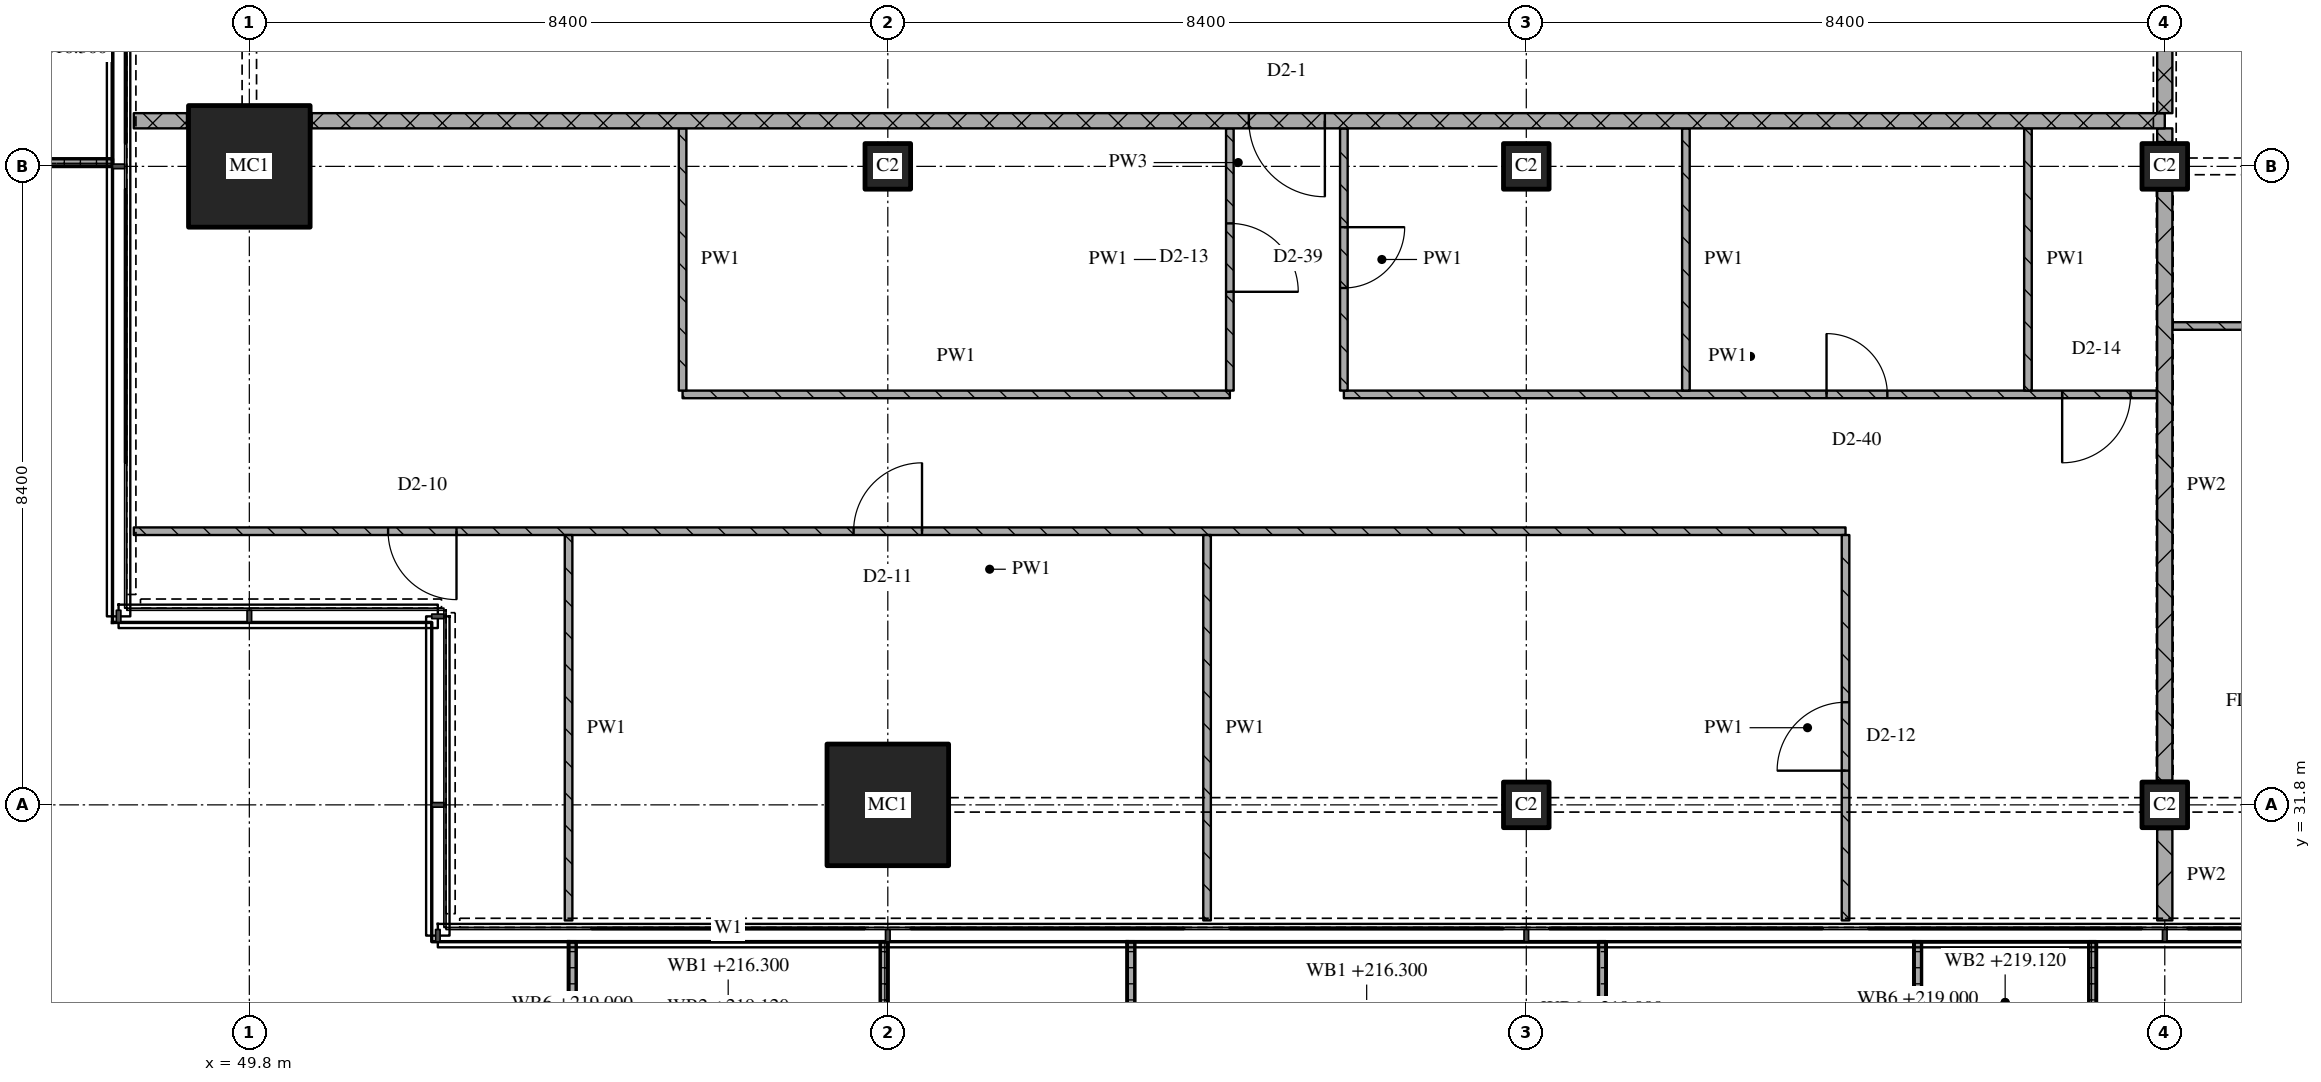
"""IFC4 building model, lengths in metres.
Left out: names, types, materials, properties, quantities, classifications, styles, units other than length and angle.
Written with IfcOpenShell. Run it as: python <this file> out.ifc"""

import sys

from ifc_helpers import new_model, si_unit, direction, frame, frame_2d, origin, origin_2d, place, context, subcontext, project, spatial, polyline, rectangle, outline, extrude, element, fill, save


model = new_model("IFC4")
c1 = context("Model", 3, precision=1e-05, world=origin(), true_north=direction((0.0, 1.0)))
c2 = subcontext(c1, "Body", "Model", "MODEL_VIEW")
j1 = project(units=[si_unit("LENGTHUNIT", "METRE"), si_unit("PLANEANGLEUNIT", "RADIAN")], contexts=[c1])
p1 = place(None, origin())
s1 = spatial("IfcSite", under=j1, at=p1, CompositionType="ELEMENT")
p2 = place(p1, origin())
s2 = spatial("IfcBuilding", under=s1, at=p2, CompositionType="ELEMENT")
p3 = place(p2, frame((0.0, 0.0, 216.3)))
s3 = spatial("IfcBuildingStorey", under=s2, at=p3, CompositionType="ELEMENT", Elevation=216.3)
for number, where, z_axis, x_axis in (
    (1, (49.8, 40.2, 0.0), (0.0, 0.0, 1.0), (1.0, 0.0, 0.0)),
    (2, (58.2, 31.8, 0.0), (0.0, 0.0, 1.0), (1.0, 0.0, 0.0)),
):
    element("IfcColumn", number, at=place(p3, frame(where, z_axis=z_axis, x_axis=x_axis)), inside=s3, PredefinedType="COLUMN", context=c2, shape_type="SweptSolid", body=[
        extrude(rectangle(XDim=1.6, YDim=1.6, at=origin_2d()), origin(), (0.0, 0.0, 1.0), 3.6),
    ])
for number, where, z_axis, x_axis in (
    (3, (58.2, 40.2, 0.0), (0.0, 0.0, 1.0), (1.0, 0.0, 0.0)),
    (4, (66.6, 31.8, 0.0), (0.0, 0.0, 1.0), (1.0, 0.0, 0.0)),
    (5, (66.6, 40.2, 0.0), (0.0, 0.0, 1.0), (1.0, 0.0, 0.0)),
    (6, (75.0, 31.8, 0.0), (0.0, 0.0, 1.0), (1.0, 0.0, 0.0)),
    (7, (75.0, 40.2, 0.0), (0.0, 0.0, 1.0), (1.0, 0.0, 0.0)),
):
    element("IfcColumn", number, at=place(p3, frame(where, z_axis=z_axis, x_axis=x_axis)), inside=s3, PredefinedType="COLUMN", context=c2, shape_type="SweptSolid", body=[
        extrude(rectangle(XDim=0.6, YDim=0.6, at=origin_2d()), origin(), (0.0, 0.0, 1.0), 3.6),
    ])
p4 = place(p3, origin())
e8 = element("IfcWall", 8, at=p4, inside=s3, PredefinedType="SOLIDWALL", context=c2, shape_type="SweptSolid", body=[
    extrude(outline(polyline([(54.0, 30.0), (54.1, 30.0), (54.1, 28.367), (58.1, 28.367), (58.1, 30.0), (58.2, 30.0), (58.2, 28.267), (54.0, 28.267), (54.0, 30.0)])), origin(), (0.0, 0.0, 1.0), 1.0),
])
p5 = place(p3, origin())
e9 = element("IfcWall", 9, at=p5, inside=s3, PredefinedType="SOLIDWALL", context=c2, shape_type="SweptSolid", body=[
    extrude(outline(polyline([(61.35, 30.0), (61.45, 30.0), (61.45, 28.233), (67.55, 28.233), (67.55, 30.0), (67.65, 30.0), (67.65, 28.133), (61.35, 28.133), (61.35, 30.0)])), origin(), (0.0, 0.0, 1.0), 1.0),
])
p6 = place(p3, origin())
e10 = element("IfcWall", 10, at=p6, inside=s3, PredefinedType="SOLIDWALL", context=c2, shape_type="SweptSolid", body=[
    extrude(outline(polyline([(71.7, 30.0), (71.8, 30.0), (71.8, 28.5), (74.0, 28.5), (74.0, 30.0), (74.1, 30.0), (74.1, 28.4), (71.7, 28.4), (71.7, 30.0)])), origin(), (0.0, 0.0, 1.0), 1.0),
])
p7 = place(p3, origin())
e11 = element("IfcWall", 11, at=p7, inside=s3, PredefinedType="SOLIDWALL", context=c2, shape_type="SweptSolid", body=[
    extrude(outline(polyline([(48.0, 44.4), (48.0, 44.3), (46.367, 44.3), (46.367, 40.3), (48.0, 40.3), (48.0, 40.2), (46.267, 40.2), (46.267, 44.4), (48.0, 44.4)])), origin(), (0.0, 0.0, 1.0), 1.0),
])
p8 = place(p3, frame((70.8, 35.4, 0.0), z_axis=(0.0, 0.0, 1.0), x_axis=(-1.0, 0.0, 0.0)))
e12 = element("IfcWall", 12, at=p8, inside=s3, PredefinedType="PARTITIONING", context=c2, shape_type="SweptSolid", body=[
    extrude(rectangle(XDim=22.52, YDim=0.1, at=frame_2d((11.26, 0.0))), origin(), (0.0, 0.0, 1.0), 3.32),
])
p9 = place(p8, frame((12.15, 0.0, 0.0)))
e13 = element("IfcOpeningElement", 13, at=p9, cuts=e12, PredefinedType="OPENING", context=c2, shape_type="SweptSolid", body=[
    extrude(rectangle(XDim=0.9, YDim=2.1, at=frame_2d((0.45, 1.05))), frame((0.0, 0.06, 0.0), z_axis=(0.0, -1.0, 0.0), x_axis=(1.0, 0.0, 0.0)), (0.0, 0.0, 1.0), 0.12),
])
p10 = place(p8, frame((18.274, 0.0, 0.0)))
e14 = element("IfcOpeningElement", 14, at=p10, cuts=e12, PredefinedType="OPENING", context=c2, shape_type="SweptSolid", body=[
    extrude(rectangle(XDim=0.9, YDim=2.1, at=frame_2d((0.45, 1.05))), frame((0.0, 0.06, 0.0), z_axis=(0.0, -1.0, 0.0), x_axis=(1.0, 0.0, 0.0)), (0.0, 0.0, 1.0), 0.12),
])
p11 = place(p3, frame((55.5, 37.2, 0.0), z_axis=(0.0, 0.0, 1.0), x_axis=(1.0, 0.0, 0.0)))
e15 = element("IfcWall", 15, at=p11, inside=s3, PredefinedType="PARTITIONING", context=c2, shape_type="SweptSolid", body=[
    extrude(rectangle(XDim=7.2, YDim=0.1, at=frame_2d((3.6, 0.0))), origin(), (0.0, 0.0, 1.0), 3.32),
])
p12 = place(p3, frame((64.2, 37.2, 0.0), z_axis=(0.0, 0.0, 1.0), x_axis=(1.0, 0.0, 0.0)))
e16 = element("IfcWall", 16, at=p12, inside=s3, PredefinedType="PARTITIONING", context=c2, shape_type="SweptSolid", body=[
    extrude(rectangle(XDim=10.7, YDim=0.1, at=frame_2d((5.35, 0.0))), origin(), (0.0, 0.0, 1.0), 3.32),
])
p13 = place(p12, frame((6.35, 0.0, 0.0)))
e17 = element("IfcOpeningElement", 17, at=p13, cuts=e16, PredefinedType="OPENING", context=c2, shape_type="SweptSolid", body=[
    extrude(rectangle(XDim=0.8, YDim=2.1, at=frame_2d((0.4, 1.05))), frame((0.0, 0.06, 0.0), z_axis=(0.0, -1.0, 0.0), x_axis=(1.0, 0.0, 0.0)), (0.0, 0.0, 1.0), 0.12),
])
p14 = place(p12, frame((9.45, 0.0, 0.0)))
e18 = element("IfcOpeningElement", 18, at=p14, cuts=e16, PredefinedType="OPENING", context=c2, shape_type="SweptSolid", body=[
    extrude(rectangle(XDim=0.9, YDim=2.1, at=frame_2d((0.45, 1.05))), frame((0.0, 0.06, 0.0), z_axis=(0.0, -1.0, 0.0), x_axis=(1.0, 0.0, 0.0)), (0.0, 0.0, 1.0), 0.12),
])
p15 = place(p3, frame((75.1, 38.1, 0.0), z_axis=(0.0, 0.0, 1.0), x_axis=(1.0, 0.0, 0.0)))
e19 = element("IfcWall", 19, at=p15, inside=s3, PredefinedType="PARTITIONING", context=c2, shape_type="SweptSolid", body=[
    extrude(rectangle(XDim=11.3, YDim=0.1, at=frame_2d((5.65, 0.0))), origin(), (0.0, 0.0, 1.0), 3.32),
])
p16 = place(p15, frame((1.75, 0.0, 0.0)))
e20 = element("IfcOpeningElement", 20, at=p16, cuts=e19, PredefinedType="OPENING", context=c2, shape_type="SweptSolid", body=[
    extrude(rectangle(XDim=0.8, YDim=2.1, at=frame_2d((0.4, 1.05))), frame((0.0, 0.06, 0.0), z_axis=(0.0, -1.0, 0.0), x_axis=(1.0, 0.0, 0.0)), (0.0, 0.0, 1.0), 0.12),
])
p17 = place(p15, frame((6.25, 0.0, 0.0)))
e21 = element("IfcOpeningElement", 21, at=p17, cuts=e19, PredefinedType="OPENING", context=c2, shape_type="SweptSolid", body=[
    extrude(rectangle(XDim=0.8, YDim=2.1, at=frame_2d((0.4, 1.05))), frame((0.0, 0.06, 0.0), z_axis=(0.0, -1.0, 0.0), x_axis=(1.0, 0.0, 0.0)), (0.0, 0.0, 1.0), 0.12),
])
p18 = place(p15, frame((9.65, 0.0, 0.0)))
e22 = element("IfcOpeningElement", 22, at=p18, cuts=e19, PredefinedType="OPENING", context=c2, shape_type="SweptSolid", body=[
    extrude(rectangle(XDim=0.9, YDim=2.1, at=frame_2d((0.45, 1.05))), frame((0.0, 0.06, 0.0), z_axis=(0.0, -1.0, 0.0), x_axis=(1.0, 0.0, 0.0)), (0.0, 0.0, 1.0), 0.12),
])
p19 = place(p3, frame((48.28, 40.8, 0.0), z_axis=(0.0, 0.0, 1.0), x_axis=(1.0, 0.0, 0.0)))
e23 = element("IfcWall", 23, at=p19, inside=s3, PredefinedType="PARTITIONING", context=c2, shape_type="SweptSolid", body=[
    extrude(rectangle(XDim=0.7, YDim=0.2, at=frame_2d((0.35, 0.0))), origin(), (0.0, 0.0, 1.0), 3.32),
])
p20 = place(p3, frame((75.0, 40.8, 0.0), z_axis=(0.0, 0.0, 1.0), x_axis=(-1.0, 0.0, 0.0)))
e24 = element("IfcWall", 24, at=p20, inside=s3, PredefinedType="PARTITIONING", context=c2, shape_type="SweptSolid", body=[
    extrude(rectangle(XDim=24.38, YDim=0.2, at=frame_2d((12.19, 0.0))), origin(), (0.0, 0.0, 1.0), 3.32),
])
p21 = place(p20, frame((11.05, 0.0, 0.0)))
e25 = element("IfcOpeningElement", 25, at=p21, cuts=e24, PredefinedType="OPENING", context=c2, shape_type="SweptSolid", body=[
    extrude(rectangle(XDim=1.0, YDim=2.1, at=frame_2d((0.5, 1.05))), frame((0.0, 0.11, 0.0), z_axis=(0.0, -1.0, 0.0), x_axis=(1.0, 0.0, 0.0)), (0.0, 0.0, 1.0), 0.22),
])
p22 = place(p3, frame((54.0, 35.35, 0.0), z_axis=(0.0, 0.0, 1.0), x_axis=(0.0, -1.0, 0.0)))
e26 = element("IfcWall", 26, at=p22, inside=s3, PredefinedType="PARTITIONING", context=c2, shape_type="SweptSolid", body=[
    extrude(rectangle(XDim=5.07, YDim=0.1, at=frame_2d((2.535, 0.0))), origin(), (0.0, 0.0, 1.0), 3.32),
])
p23 = place(p3, frame((55.5, 40.7, 0.0), z_axis=(0.0, 0.0, 1.0), x_axis=(0.0, -1.0, 0.0)))
e27 = element("IfcWall", 27, at=p23, inside=s3, PredefinedType="PARTITIONING", context=c2, shape_type="SweptSolid", body=[
    extrude(rectangle(XDim=3.45, YDim=0.1, at=frame_2d((1.725, 0.0))), origin(), (0.0, 0.0, 1.0), 3.32),
])
p24 = place(p3, frame((62.4, 35.35, 0.0), z_axis=(0.0, 0.0, 1.0), x_axis=(0.0, -1.0, 0.0)))
e28 = element("IfcWall", 28, at=p24, inside=s3, PredefinedType="PARTITIONING", context=c2, shape_type="SweptSolid", body=[
    extrude(rectangle(XDim=5.07, YDim=0.1, at=frame_2d((2.535, 0.0))), origin(), (0.0, 0.0, 1.0), 3.32),
])
p25 = place(p3, frame((62.7, 37.25, 0.0), z_axis=(0.0, 0.0, 1.0), x_axis=(0.0, 1.0, 0.0)))
e29 = element("IfcWall", 29, at=p25, inside=s3, PredefinedType="PARTITIONING", context=c2, shape_type="SweptSolid", body=[
    extrude(rectangle(XDim=3.45, YDim=0.1, at=frame_2d((1.725, 0.0))), origin(), (0.0, 0.0, 1.0), 3.32),
])
p26 = place(p25, frame((1.3, 0.0, 0.0)))
e30 = element("IfcOpeningElement", 30, at=p26, cuts=e29, PredefinedType="OPENING", context=c2, shape_type="SweptSolid", body=[
    extrude(rectangle(XDim=0.9, YDim=2.1, at=frame_2d((0.45, 1.05))), frame((0.0, 0.06, 0.0), z_axis=(0.0, -1.0, 0.0), x_axis=(1.0, 0.0, 0.0)), (0.0, 0.0, 1.0), 0.12),
])
p27 = place(p3, frame((64.2, 40.7, 0.0), z_axis=(0.0, 0.0, 1.0), x_axis=(0.0, -1.0, 0.0)))
e31 = element("IfcWall", 31, at=p27, inside=s3, PredefinedType="PARTITIONING", context=c2, shape_type="SweptSolid", body=[
    extrude(rectangle(XDim=3.45, YDim=0.1, at=frame_2d((1.725, 0.0))), origin(), (0.0, 0.0, 1.0), 3.32),
])
p28 = place(p27, frame((1.3, 0.0, 0.0)))
e32 = element("IfcOpeningElement", 32, at=p28, cuts=e31, PredefinedType="OPENING", context=c2, shape_type="SweptSolid", body=[
    extrude(rectangle(XDim=0.8, YDim=2.1, at=frame_2d((0.4, 1.05))), frame((0.0, 0.06, 0.0), z_axis=(0.0, -1.0, 0.0), x_axis=(1.0, 0.0, 0.0)), (0.0, 0.0, 1.0), 0.12),
])
p29 = place(p3, frame((68.7, 40.7, 0.0), z_axis=(0.0, 0.0, 1.0), x_axis=(0.0, -1.0, 0.0)))
e33 = element("IfcWall", 33, at=p29, inside=s3, PredefinedType="PARTITIONING", context=c2, shape_type="SweptSolid", body=[
    extrude(rectangle(XDim=3.45, YDim=0.1, at=frame_2d((1.725, 0.0))), origin(), (0.0, 0.0, 1.0), 3.32),
])
p30 = place(p3, frame((70.8, 30.28, 0.0), z_axis=(0.0, 0.0, 1.0), x_axis=(0.0, 1.0, 0.0)))
e34 = element("IfcWall", 34, at=p30, inside=s3, PredefinedType="PARTITIONING", context=c2, shape_type="SweptSolid", body=[
    extrude(rectangle(XDim=5.07, YDim=0.1, at=frame_2d((2.535, 0.0))), origin(), (0.0, 0.0, 1.0), 3.32),
])
p31 = place(p30, frame((1.97, 0.0, 0.0)))
e35 = element("IfcOpeningElement", 35, at=p31, cuts=e34, PredefinedType="OPENING", context=c2, shape_type="SweptSolid", body=[
    extrude(rectangle(XDim=0.9, YDim=2.1, at=frame_2d((0.45, 1.05))), frame((0.0, 0.06, 0.0), z_axis=(0.0, -1.0, 0.0), x_axis=(1.0, 0.0, 0.0)), (0.0, 0.0, 1.0), 0.12),
])
p32 = place(p3, frame((73.2, 40.7, 0.0), z_axis=(0.0, 0.0, 1.0), x_axis=(0.0, -1.0, 0.0)))
e36 = element("IfcWall", 36, at=p32, inside=s3, PredefinedType="PARTITIONING", context=c2, shape_type="SweptSolid", body=[
    extrude(rectangle(XDim=3.45, YDim=0.1, at=frame_2d((1.725, 0.0))), origin(), (0.0, 0.0, 1.0), 3.32),
])
p33 = place(p3, frame((75.0, 43.1, 0.0), z_axis=(0.0, 0.0, 1.0), x_axis=(0.0, -1.0, 0.0)))
e37 = element("IfcWall", 37, at=p33, inside=s3, PredefinedType="PARTITIONING", context=c2, shape_type="SweptSolid", body=[
    extrude(rectangle(XDim=2.2, YDim=0.2, at=frame_2d((1.1, 0.0))), origin(), (0.0, 0.0, 1.0), 2.53),
])
p34 = place(p3, frame((75.0, 31.48, 0.0), z_axis=(0.0, 0.0, 1.0), x_axis=(0.0, -1.0, 0.0)))
e38 = element("IfcWall", 38, at=p34, inside=s3, PredefinedType="PARTITIONING", context=c2, shape_type="SweptSolid", body=[
    extrude(rectangle(XDim=1.2, YDim=0.2, at=frame_2d((0.6, 0.0))), origin(), (0.0, 0.0, 1.0), 3.32),
])
p35 = place(p3, frame((75.0, 39.88, 0.0), z_axis=(0.0, 0.0, 1.0), x_axis=(0.0, -1.0, 0.0)))
e39 = element("IfcWall", 39, at=p35, inside=s3, PredefinedType="PARTITIONING", context=c2, shape_type="SweptSolid", body=[
    extrude(rectangle(XDim=7.76, YDim=0.2, at=frame_2d((3.88, 0.0))), origin(), (0.0, 0.0, 1.0), 2.72),
])
p36 = place(p3, frame((75.0, 40.7, 0.0), z_axis=(0.0, 0.0, 1.0), x_axis=(0.0, -1.0, 0.0)))
e40 = element("IfcWall", 40, at=p36, inside=s3, PredefinedType="PARTITIONING", context=c2, shape_type="SweptSolid", body=[
    extrude(rectangle(XDim=0.18, YDim=0.2, at=frame_2d((0.09, 0.0))), origin(), (0.0, 0.0, 1.0), 3.32),
])
p37 = place(p9, origin())
e41 = element("IfcDoor", 41, at=p37, inside=s3, OperationType="SINGLE_SWING_RIGHT", PredefinedType="DOOR", context=c2, shape_type="SweptSolid", body=[
    extrude(rectangle(XDim=0.9, YDim=2.1, at=frame_2d((0.45, 1.05))), frame((0.0, 0.025, 0.0), z_axis=(0.0, -1.0, 0.0), x_axis=(1.0, 0.0, 0.0)), (0.0, 0.0, 1.0), 0.05),
])
fill(e13, e41)
p38 = place(p10, origin())
e42 = element("IfcDoor", 42, at=p38, inside=s3, OperationType="SINGLE_SWING_LEFT", PredefinedType="DOOR", context=c2, shape_type="SweptSolid", body=[
    extrude(rectangle(XDim=0.9, YDim=2.1, at=frame_2d((0.45, 1.05))), frame((0.0, 0.025, 0.0), z_axis=(0.0, -1.0, 0.0), x_axis=(1.0, 0.0, 0.0)), (0.0, 0.0, 1.0), 0.05),
])
fill(e14, e42)
p39 = place(p13, origin())
e43 = element("IfcDoor", 43, at=p39, inside=s3, OperationType="SINGLE_SWING_LEFT", PredefinedType="DOOR", context=c2, shape_type="SweptSolid", body=[
    extrude(rectangle(XDim=0.8, YDim=2.1, at=frame_2d((0.4, 1.05))), frame((0.0, 0.025, 0.0), z_axis=(0.0, -1.0, 0.0), x_axis=(1.0, 0.0, 0.0)), (0.0, 0.0, 1.0), 0.05),
])
fill(e17, e43)
p40 = place(p14, origin())
e44 = element("IfcDoor", 44, at=p40, inside=s3, OperationType="SINGLE_SWING_RIGHT", PredefinedType="DOOR", context=c2, shape_type="SweptSolid", body=[
    extrude(rectangle(XDim=0.9, YDim=2.1, at=frame_2d((0.45, 1.05))), frame((0.0, 0.025, 0.0), z_axis=(0.0, -1.0, 0.0), x_axis=(1.0, 0.0, 0.0)), (0.0, 0.0, 1.0), 0.05),
])
fill(e18, e44)
p41 = place(p21, origin())
e45 = element("IfcDoor", 45, at=p41, inside=s3, OperationType="SINGLE_SWING_LEFT", PredefinedType="DOOR", context=c2, shape_type="SweptSolid", body=[
    extrude(rectangle(XDim=1.0, YDim=2.1, at=frame_2d((0.5, 1.05))), frame((0.0, 0.025, 0.0), z_axis=(0.0, -1.0, 0.0), x_axis=(1.0, 0.0, 0.0)), (0.0, 0.0, 1.0), 0.05),
])
fill(e25, e45)
p42 = place(p26, origin())
e46 = element("IfcDoor", 46, at=p42, inside=s3, OperationType="SINGLE_SWING_RIGHT", PredefinedType="DOOR", context=c2, shape_type="SweptSolid", body=[
    extrude(rectangle(XDim=0.9, YDim=2.1, at=frame_2d((0.45, 1.05))), frame((0.0, 0.025, 0.0), z_axis=(0.0, -1.0, 0.0), x_axis=(1.0, 0.0, 0.0)), (0.0, 0.0, 1.0), 0.05),
])
fill(e30, e46)
p43 = place(p28, origin())
e47 = element("IfcDoor", 47, at=p43, inside=s3, OperationType="SINGLE_SWING_LEFT", PredefinedType="DOOR", context=c2, shape_type="SweptSolid", body=[
    extrude(rectangle(XDim=0.8, YDim=2.1, at=frame_2d((0.4, 1.05))), frame((0.0, 0.025, 0.0), z_axis=(0.0, -1.0, 0.0), x_axis=(1.0, 0.0, 0.0)), (0.0, 0.0, 1.0), 0.05),
])
fill(e32, e47)
p44 = place(p31, origin())
e48 = element("IfcDoor", 48, at=p44, inside=s3, OperationType="SINGLE_SWING_LEFT", PredefinedType="DOOR", context=c2, shape_type="SweptSolid", body=[
    extrude(rectangle(XDim=0.9, YDim=2.1, at=frame_2d((0.45, 1.05))), frame((0.0, 0.025, 0.0), z_axis=(0.0, -1.0, 0.0), x_axis=(1.0, 0.0, 0.0)), (0.0, 0.0, 1.0), 0.05),
])
fill(e35, e48)
save(model, sys.argv[1])
